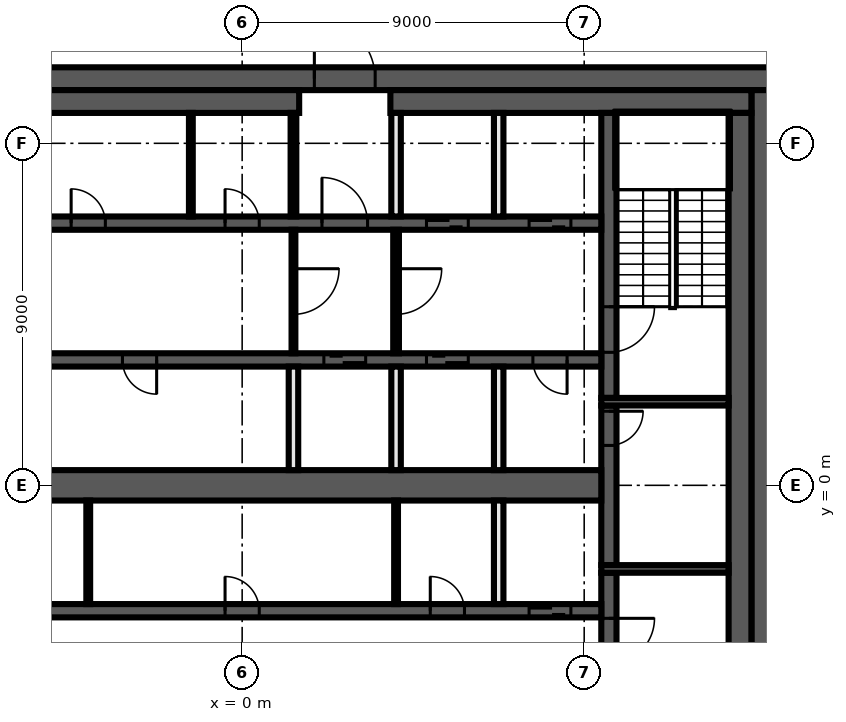
"""IFC4 building model, lengths in metres.
Left out: names, types, materials, properties, quantities, classifications, styles, units other than length and angle.
Written with IfcOpenShell. Run it as: python <this file> out.ifc"""

import sys

from ifc_helpers import new_model, si_unit, direction, frame, frame_2d, origin, place, context, subcontext, project, spatial, rectangle, extrude, element, fill, save


model = new_model("IFC4")
c1 = context("Model", 3, precision=1e-05, world=origin(), true_north=direction((0.0, 1.0)))
c2 = subcontext(c1, "Body", "Model", "MODEL_VIEW")
j1 = project(units=[si_unit("LENGTHUNIT", "METRE"), si_unit("PLANEANGLEUNIT", "RADIAN")], contexts=[c1])
p1 = place(None, origin())
s1 = spatial("IfcSite", under=j1, at=p1, CompositionType="ELEMENT")
p2 = place(p1, origin())
s2 = spatial("IfcBuilding", under=s1, at=p2, CompositionType="ELEMENT")
p3 = place(p2, frame((0.0, 0.0, 363.2)))
s3 = spatial("IfcBuildingStorey", under=s2, at=p3, CompositionType="ELEMENT", Elevation=363.2)
p4 = place(p3, frame((11.367, -20.469, 0.0), z_axis=(0.0, 0.0, 1.0), x_axis=(0.424125024155, 0.905603646131, 0.0)))
e1 = element("IfcWall", 1, at=p4, inside=s3, PredefinedType="SOLIDWALL", context=c2, shape_type="SweptSolid", body=[
    extrude(rectangle(XDim=28.801, YDim=0.25, at=frame_2d((14.401, 0.0))), origin(), (0.0, 0.0, 1.0), 3.8),
])
p5 = place(p3, frame((23.583, 5.614, 0.0), z_axis=(0.0, 0.0, 1.0), x_axis=(-0.671256862452, 0.741224813812, 0.0)))
e2 = element("IfcWall", 2, at=p5, inside=s3, PredefinedType="SOLIDWALL", context=c2, shape_type="SweptSolid", body=[
    extrude(rectangle(XDim=20.856, YDim=0.25, at=frame_2d((10.428, 0.0))), origin(), (0.0, 0.0, 1.0), 3.8),
])
p6 = place(p3, frame((-14.0, 10.7, 0.0), z_axis=(0.0, 0.0, 1.0), x_axis=(1.0, 0.0, 0.0)))
e3 = element("IfcWall", 3, at=p6, inside=s3, PredefinedType="SHEAR", context=c2, shape_type="SweptSolid", body=[
    extrude(rectangle(XDim=28.0, YDim=0.6, at=frame_2d((14.0, 0.0))), origin(), (0.0, 0.0, 1.0), 3.8),
])
p7 = place(p6, frame((15.9, 0.0, 0.0)))
e4 = element("IfcOpeningElement", 4, at=p7, cuts=e3, PredefinedType="OPENING", context=c2, shape_type="SweptSolid", body=[
    extrude(rectangle(XDim=1.6, YDim=2.1, at=frame_2d((0.8, 1.05))), frame((0.0, 0.31, 0.0), z_axis=(0.0, -1.0, 0.0), x_axis=(1.0, 0.0, 0.0)), (0.0, 0.0, 1.0), 0.62),
])
p8 = place(p3, frame((13.7, 10.4, 0.0), z_axis=(0.0, 0.0, 1.0), x_axis=(0.0, -1.0, 0.0)))
e5 = element("IfcWall", 5, at=p8, inside=s3, PredefinedType="SHEAR", context=c2, shape_type="SweptSolid", body=[
    extrude(rectangle(XDim=20.8, YDim=0.6, at=frame_2d((10.4, 0.0))), origin(), (0.0, 0.0, 1.0), 3.8),
])
p9 = place(p3, frame((-13.4, 10.1, 0.0), z_axis=(0.0, 0.0, 1.0), x_axis=(1.0, 0.0, 0.0)))
e6 = element("IfcWall", 6, at=p9, inside=s3, PredefinedType="SHEAR", context=c2, shape_type="SweptSolid", body=[
    extrude(rectangle(XDim=14.9, YDim=0.6, at=frame_2d((7.45, 0.0))), origin(), (0.0, 0.0, 1.0), 3.8),
])
p10 = place(p3, frame((3.9, 10.1, 0.0), z_axis=(0.0, 0.0, 1.0), x_axis=(1.0, 0.0, 0.0)))
e7 = element("IfcWall", 7, at=p10, inside=s3, PredefinedType="SHEAR", context=c2, shape_type="SweptSolid", body=[
    extrude(rectangle(XDim=9.5, YDim=0.6, at=frame_2d((4.75, 0.0))), origin(), (0.0, 0.0, 1.0), 3.8),
])
p11 = place(p3, frame((13.1, 9.8, 0.0), z_axis=(0.0, 0.0, 1.0), x_axis=(0.0, -1.0, 0.0)))
e8 = element("IfcWall", 8, at=p11, inside=s3, PredefinedType="SHEAR", context=c2, shape_type="SweptSolid", body=[
    extrude(rectangle(XDim=19.6, YDim=0.6, at=frame_2d((9.8, 0.0))), origin(), (0.0, 0.0, 1.0), 3.8),
])
p12 = place(p3, frame((9.65, -2.3, 0.0), z_axis=(0.0, 0.0, 1.0), x_axis=(0.0, -1.0, 0.0)))
e9 = element("IfcWall", 9, at=p12, inside=s3, PredefinedType="SHEAR", context=c2, shape_type="SweptSolid", body=[
    extrude(rectangle(XDim=7.5, YDim=0.4, at=frame_2d((3.75, 0.0))), origin(), (0.0, 0.0, 1.0), 3.8),
])
p13 = place(p12, frame((1.2, 0.0, 0.0)))
e10 = element("IfcOpeningElement", 10, at=p13, cuts=e9, PredefinedType="OPENING", context=c2, shape_type="SweptSolid", body=[
    extrude(rectangle(XDim=1.2, YDim=2.1, at=frame_2d((0.6, 1.05))), frame((0.0, 0.21, 0.0), z_axis=(0.0, -1.0, 0.0), x_axis=(1.0, 0.0, 0.0)), (0.0, 0.0, 1.0), 0.42),
])
p14 = place(p3, frame((9.65, 2.1, 0.0), z_axis=(0.0, 0.0, 1.0), x_axis=(0.0, -1.0, 0.0)))
e11 = element("IfcWall", 11, at=p14, inside=s3, PredefinedType="SHEAR", context=c2, shape_type="SweptSolid", body=[
    extrude(rectangle(XDim=4.2, YDim=0.4, at=frame_2d((2.1, 0.0))), origin(), (0.0, 0.0, 1.0), 3.8),
])
p15 = place(p14, frame((0.15, 0.0, 0.0)))
e12 = element("IfcOpeningElement", 12, at=p15, cuts=e11, PredefinedType="OPENING", context=c2, shape_type="SweptSolid", body=[
    extrude(rectangle(XDim=0.9, YDim=2.1, at=frame_2d((0.45, 1.05))), frame((0.0, 0.21, 0.0), z_axis=(0.0, -1.0, 0.0), x_axis=(1.0, 0.0, 0.0)), (0.0, 0.0, 1.0), 0.42),
])
p16 = place(p3, frame((9.65, 9.8, 0.0), z_axis=(0.0, 0.0, 1.0), x_axis=(0.0, -1.0, 0.0)))
e13 = element("IfcWall", 13, at=p16, inside=s3, PredefinedType="SHEAR", context=c2, shape_type="SweptSolid", body=[
    extrude(rectangle(XDim=7.5, YDim=0.4, at=frame_2d((3.75, 0.0))), origin(), (0.0, 0.0, 1.0), 3.8),
])
p17 = place(p16, frame((5.1, 0.0, 0.0)))
e14 = element("IfcOpeningElement", 14, at=p17, cuts=e13, PredefinedType="OPENING", context=c2, shape_type="SweptSolid", body=[
    extrude(rectangle(XDim=1.2, YDim=2.1, at=frame_2d((0.6, 1.05))), frame((0.0, 0.21, 0.0), z_axis=(0.0, -1.0, 0.0), x_axis=(1.0, 0.0, 0.0)), (0.0, 0.0, 1.0), 0.42),
])
for number, where, z_axis, x_axis in (
    (15, (9.45, 2.2, 0.0), (0.0, 0.0, 1.0), (1.0, 0.0, 0.0)),
    (16, (9.45, -2.2, 0.0), (0.0, 0.0, 1.0), (1.0, 0.0, 0.0)),
):
    element("IfcWall", number, at=place(p3, frame(where, z_axis=z_axis, x_axis=x_axis)), inside=s3, PredefinedType="SHEAR", context=c2, shape_type="SweptSolid", body=[
        extrude(rectangle(XDim=3.35, YDim=0.2, at=frame_2d((1.675, 0.0))), origin(), (0.0, 0.0, 1.0), 3.8),
    ])
p18 = place(p3, frame((-9.45, 6.9, 0.0), z_axis=(0.0, 0.0, 1.0), x_axis=(1.0, 0.0, 0.0)))
e17 = element("IfcWall", 17, at=p18, inside=s3, PredefinedType="SHEAR", context=c2, shape_type="SweptSolid", body=[
    extrude(rectangle(XDim=18.9, YDim=0.35, at=frame_2d((9.45, 0.0))), origin(), (0.0, 0.0, 1.0), 3.8),
])
p19 = place(p18, frame((11.55, 0.0, 0.0)))
e18 = element("IfcOpeningElement", 18, at=p19, cuts=e17, PredefinedType="OPENING", context=c2, shape_type="SweptSolid", body=[
    extrude(rectangle(XDim=1.2, YDim=2.1, at=frame_2d((0.6, 1.05))), frame((0.0, 0.185, 0.0), z_axis=(0.0, -1.0, 0.0), x_axis=(1.0, 0.0, 0.0)), (0.0, 0.0, 1.0), 0.37),
])
p20 = place(p18, frame((14.3, 0.0, 0.0)))
e19 = element("IfcOpeningElement", 19, at=p20, cuts=e17, PredefinedType="OPENING", context=c2, shape_type="SweptSolid", body=[
    extrude(rectangle(XDim=1.1, YDim=2.1, at=frame_2d((0.55, 1.05))), frame((0.0, 0.185, 0.0), z_axis=(0.0, -1.0, 0.0), x_axis=(1.0, 0.0, 0.0)), (0.0, 0.0, 1.0), 0.37),
])
p21 = place(p18, frame((17.0, 0.0, 0.0)))
e20 = element("IfcOpeningElement", 20, at=p21, cuts=e17, PredefinedType="OPENING", context=c2, shape_type="SweptSolid", body=[
    extrude(rectangle(XDim=1.1, YDim=2.1, at=frame_2d((0.55, 1.05))), frame((0.0, 0.185, 0.0), z_axis=(0.0, -1.0, 0.0), x_axis=(1.0, 0.0, 0.0)), (0.0, 0.0, 1.0), 0.37),
])
p22 = place(p18, frame((0.9, 0.0, 0.0)))
e21 = element("IfcOpeningElement", 21, at=p22, cuts=e17, PredefinedType="OPENING", context=c2, shape_type="SweptSolid", body=[
    extrude(rectangle(XDim=0.9, YDim=2.1, at=frame_2d((0.45, 1.05))), frame((0.0, 0.185, 0.0), z_axis=(0.0, -1.0, 0.0), x_axis=(1.0, 0.0, 0.0)), (0.0, 0.0, 1.0), 0.37),
])
p23 = place(p18, frame((4.95, 0.0, 0.0)))
e22 = element("IfcOpeningElement", 22, at=p23, cuts=e17, PredefinedType="OPENING", context=c2, shape_type="SweptSolid", body=[
    extrude(rectangle(XDim=0.9, YDim=2.1, at=frame_2d((0.45, 1.05))), frame((0.0, 0.185, 0.0), z_axis=(0.0, -1.0, 0.0), x_axis=(1.0, 0.0, 0.0)), (0.0, 0.0, 1.0), 0.37),
])
p24 = place(p18, frame((9.0, 0.0, 0.0)))
e23 = element("IfcOpeningElement", 23, at=p24, cuts=e17, PredefinedType="OPENING", context=c2, shape_type="SweptSolid", body=[
    extrude(rectangle(XDim=0.9, YDim=2.1, at=frame_2d((0.45, 1.05))), frame((0.0, 0.185, 0.0), z_axis=(0.0, -1.0, 0.0), x_axis=(1.0, 0.0, 0.0)), (0.0, 0.0, 1.0), 0.37),
])
p25 = place(p3, frame((9.45, 3.3, 0.0), z_axis=(0.0, 0.0, 1.0), x_axis=(-1.0, 0.0, 0.0)))
e24 = element("IfcWall", 24, at=p25, inside=s3, PredefinedType="SHEAR", context=c2, shape_type="SweptSolid", body=[
    extrude(rectangle(XDim=18.9, YDim=0.35, at=frame_2d((9.45, 0.0))), origin(), (0.0, 0.0, 1.0), 3.8),
])
p26 = place(p25, frame((6.2, 0.0, 0.0)))
e25 = element("IfcOpeningElement", 25, at=p26, cuts=e24, PredefinedType="OPENING", context=c2, shape_type="SweptSolid", body=[
    extrude(rectangle(XDim=1.1, YDim=2.1, at=frame_2d((0.55, 1.05))), frame((0.0, 0.185, 0.0), z_axis=(0.0, -1.0, 0.0), x_axis=(1.0, 0.0, 0.0)), (0.0, 0.0, 1.0), 0.37),
])
p27 = place(p25, frame((3.5, 0.0, 0.0)))
e26 = element("IfcOpeningElement", 26, at=p27, cuts=e24, PredefinedType="OPENING", context=c2, shape_type="SweptSolid", body=[
    extrude(rectangle(XDim=1.1, YDim=2.1, at=frame_2d((0.55, 1.05))), frame((0.0, 0.185, 0.0), z_axis=(0.0, -1.0, 0.0), x_axis=(1.0, 0.0, 0.0)), (0.0, 0.0, 1.0), 0.37),
])
p28 = place(p25, frame((0.9, 0.0, 0.0)))
e27 = element("IfcOpeningElement", 27, at=p28, cuts=e24, PredefinedType="OPENING", context=c2, shape_type="SweptSolid", body=[
    extrude(rectangle(XDim=0.9, YDim=2.1, at=frame_2d((0.45, 1.05))), frame((0.0, 0.185, 0.0), z_axis=(0.0, -1.0, 0.0), x_axis=(1.0, 0.0, 0.0)), (0.0, 0.0, 1.0), 0.37),
])
p29 = place(p25, frame((17.1, 0.0, 0.0)))
e28 = element("IfcOpeningElement", 28, at=p29, cuts=e24, PredefinedType="OPENING", context=c2, shape_type="SweptSolid", body=[
    extrude(rectangle(XDim=0.9, YDim=2.1, at=frame_2d((0.45, 1.05))), frame((0.0, 0.185, 0.0), z_axis=(0.0, -1.0, 0.0), x_axis=(1.0, 0.0, 0.0)), (0.0, 0.0, 1.0), 0.37),
])
p30 = place(p25, frame((11.7, 0.0, 0.0)))
e29 = element("IfcOpeningElement", 29, at=p30, cuts=e24, PredefinedType="OPENING", context=c2, shape_type="SweptSolid", body=[
    extrude(rectangle(XDim=0.9, YDim=2.1, at=frame_2d((0.45, 1.05))), frame((0.0, 0.185, 0.0), z_axis=(0.0, -1.0, 0.0), x_axis=(1.0, 0.0, 0.0)), (0.0, 0.0, 1.0), 0.37),
])
p31 = place(p3, frame((-9.45, -3.3, 0.0), z_axis=(0.0, 0.0, 1.0), x_axis=(1.0, 0.0, 0.0)))
e30 = element("IfcWall", 30, at=p31, inside=s3, PredefinedType="SHEAR", context=c2, shape_type="SweptSolid", body=[
    extrude(rectangle(XDim=18.9, YDim=0.35, at=frame_2d((9.45, 0.0))), origin(), (0.0, 0.0, 1.0), 3.8),
])
p32 = place(p31, frame((17.0, 0.0, 0.0)))
e31 = element("IfcOpeningElement", 31, at=p32, cuts=e30, PredefinedType="OPENING", context=c2, shape_type="SweptSolid", body=[
    extrude(rectangle(XDim=1.1, YDim=2.1, at=frame_2d((0.55, 1.05))), frame((0.0, 0.185, 0.0), z_axis=(0.0, -1.0, 0.0), x_axis=(1.0, 0.0, 0.0)), (0.0, 0.0, 1.0), 0.37),
])
p33 = place(p31, frame((2.25, 0.0, 0.0)))
e32 = element("IfcOpeningElement", 32, at=p33, cuts=e30, PredefinedType="OPENING", context=c2, shape_type="SweptSolid", body=[
    extrude(rectangle(XDim=0.9, YDim=2.1, at=frame_2d((0.45, 1.05))), frame((0.0, 0.185, 0.0), z_axis=(0.0, -1.0, 0.0), x_axis=(1.0, 0.0, 0.0)), (0.0, 0.0, 1.0), 0.37),
])
p34 = place(p31, frame((9.0, 0.0, 0.0)))
e33 = element("IfcOpeningElement", 33, at=p34, cuts=e30, PredefinedType="OPENING", context=c2, shape_type="SweptSolid", body=[
    extrude(rectangle(XDim=0.9, YDim=2.1, at=frame_2d((0.45, 1.05))), frame((0.0, 0.185, 0.0), z_axis=(0.0, -1.0, 0.0), x_axis=(1.0, 0.0, 0.0)), (0.0, 0.0, 1.0), 0.37),
])
p35 = place(p31, frame((14.4, 0.0, 0.0)))
e34 = element("IfcOpeningElement", 34, at=p35, cuts=e30, PredefinedType="OPENING", context=c2, shape_type="SweptSolid", body=[
    extrude(rectangle(XDim=0.9, YDim=2.1, at=frame_2d((0.45, 1.05))), frame((0.0, 0.185, 0.0), z_axis=(0.0, -1.0, 0.0), x_axis=(1.0, 0.0, 0.0)), (0.0, 0.0, 1.0), 0.37),
])
p36 = place(p3, frame((-9.45, 0.0, 0.0), z_axis=(0.0, 0.0, 1.0), x_axis=(1.0, 0.0, 0.0)))
e35 = element("IfcWall", 35, at=p36, inside=s3, PredefinedType="SHEAR", context=c2, shape_type="SweptSolid", body=[
    extrude(rectangle(XDim=18.9, YDim=0.8, at=frame_2d((9.45, 0.0))), origin(), (0.0, 0.0, 1.0), 3.8),
])
for number, where, z_axis, x_axis in (
    (36, (6.75, -3.125, 0.0), (0.0, 0.0, 1.0), (0.0, 1.0, 0.0)),
    (37, (6.75, 0.4, 0.0), (0.0, 0.0, 1.0), (0.0, 1.0, 0.0)),
    (38, (6.75, 7.075, 0.0), (0.0, 0.0, 1.0), (0.0, 1.0, 0.0)),
):
    element("IfcWall", number, at=place(p3, frame(where, z_axis=z_axis, x_axis=x_axis)), inside=s3, PredefinedType="SOLIDWALL", context=c2, shape_type="SweptSolid", body=[
        extrude(rectangle(XDim=2.725, YDim=0.25, at=frame_2d((1.363, 0.0))), origin(), (0.0, 0.0, 1.0), 3.8),
    ])
p37 = place(p3, frame((4.05, 6.725, 0.0), z_axis=(0.0, 0.0, 1.0), x_axis=(0.0, -1.0, 0.0)))
e39 = element("IfcWall", 39, at=p37, inside=s3, PredefinedType="PARTITIONING", context=c2, shape_type="SweptSolid", body=[
    extrude(rectangle(XDim=3.25, YDim=0.15, at=frame_2d((1.625, 0.0))), origin(), (0.0, 0.0, 1.0), 3.8),
])
p38 = place(p37, frame((1.025, 0.0, 0.0)))
e40 = element("IfcOpeningElement", 40, at=p38, cuts=e39, PredefinedType="OPENING", context=c2, shape_type="SweptSolid", body=[
    extrude(rectangle(XDim=1.2, YDim=2.1, at=frame_2d((0.6, 1.05))), frame((0.0, 0.085, 0.0), z_axis=(0.0, -1.0, 0.0), x_axis=(1.0, 0.0, 0.0)), (0.0, 0.0, 1.0), 0.17),
])
p39 = place(p3, frame((4.05, -3.125, 0.0), z_axis=(0.0, 0.0, 1.0), x_axis=(0.0, 1.0, 0.0)))
e41 = element("IfcWall", 41, at=p39, inside=s3, PredefinedType="PARTITIONING", context=c2, shape_type="SweptSolid", body=[
    extrude(rectangle(XDim=2.725, YDim=0.1, at=frame_2d((1.363, 0.0))), origin(), (0.0, 0.0, 1.0), 3.8),
])
for number, where, z_axis, x_axis in (
    (42, (4.05, 0.4, 0.0), (0.0, 0.0, 1.0), (0.0, 1.0, 0.0)),
    (43, (4.05, 7.075, 0.0), (0.0, 0.0, 1.0), (0.0, 1.0, 0.0)),
):
    element("IfcWall", number, at=place(p3, frame(where, z_axis=z_axis, x_axis=x_axis)), inside=s3, PredefinedType="SOLIDWALL", context=c2, shape_type="SweptSolid", body=[
        extrude(rectangle(XDim=2.725, YDim=0.25, at=frame_2d((1.363, 0.0))), origin(), (0.0, 0.0, 1.0), 3.8),
    ])
p40 = place(p3, frame((1.35, 7.075, 0.0), z_axis=(0.0, 0.0, 1.0), x_axis=(0.0, 1.0, 0.0)))
e44 = element("IfcWall", 44, at=p40, inside=s3, PredefinedType="PARTITIONING", context=c2, shape_type="SweptSolid", body=[
    extrude(rectangle(XDim=2.725, YDim=0.15, at=frame_2d((1.363, 0.0))), origin(), (0.0, 0.0, 1.0), 3.8),
])
p41 = place(p3, frame((1.35, 6.725, 0.0), z_axis=(0.0, 0.0, 1.0), x_axis=(0.0, -1.0, 0.0)))
e45 = element("IfcWall", 45, at=p41, inside=s3, PredefinedType="PARTITIONING", context=c2, shape_type="SweptSolid", body=[
    extrude(rectangle(XDim=3.25, YDim=0.1, at=frame_2d((1.625, 0.0))), origin(), (0.0, 0.0, 1.0), 3.8),
])
p42 = place(p41, frame((1.025, 0.0, 0.0)))
e46 = element("IfcOpeningElement", 46, at=p42, cuts=e45, PredefinedType="OPENING", context=c2, shape_type="SweptSolid", body=[
    extrude(rectangle(XDim=1.2, YDim=2.1, at=frame_2d((0.6, 1.05))), frame((0.0, 0.06, 0.0), z_axis=(0.0, -1.0, 0.0), x_axis=(1.0, 0.0, 0.0)), (0.0, 0.0, 1.0), 0.12),
])
p43 = place(p3, frame((1.35, 0.4, 0.0), z_axis=(0.0, 0.0, 1.0), x_axis=(0.0, 1.0, 0.0)))
e47 = element("IfcWall", 47, at=p43, inside=s3, PredefinedType="SOLIDWALL", context=c2, shape_type="SweptSolid", body=[
    extrude(rectangle(XDim=2.725, YDim=0.25, at=frame_2d((1.363, 0.0))), origin(), (0.0, 0.0, 1.0), 3.8),
])
for number, where, z_axis, x_axis in (
    (48, (-1.35, 7.075, 0.0), (0.0, 0.0, 1.0), (0.0, 1.0, 0.0)),
    (49, (-4.05, -3.125, 0.0), (0.0, 0.0, 1.0), (0.0, 1.0, 0.0)),
):
    element("IfcWall", number, at=place(p3, frame(where, z_axis=z_axis, x_axis=x_axis)), inside=s3, PredefinedType="PARTITIONING", context=c2, shape_type="SweptSolid", body=[
        extrude(rectangle(XDim=2.725, YDim=0.1, at=frame_2d((1.363, 0.0))), origin(), (0.0, 0.0, 1.0), 3.8),
    ])
p44 = place(p15, origin())
e50 = element("IfcDoor", 50, at=p44, inside=s3, OperationType="SINGLE_SWING_RIGHT", PredefinedType="DOOR", context=c2, shape_type="SweptSolid", body=[
    extrude(rectangle(XDim=0.9, YDim=2.1, at=frame_2d((0.45, 1.05))), frame((0.0, 0.025, 0.0), z_axis=(0.0, -1.0, 0.0), x_axis=(1.0, 0.0, 0.0)), (0.0, 0.0, 1.0), 0.05),
])
fill(e12, e50)
p45 = place(p7, origin())
e51 = element("IfcDoor", 51, at=p45, inside=s3, OperationType="DOUBLE_DOOR_SINGLE_SWING", PredefinedType="DOOR", context=c2, shape_type="SweptSolid", body=[
    extrude(rectangle(XDim=1.6, YDim=2.1, at=frame_2d((0.8, 1.05))), frame((0.0, 0.025, 0.0), z_axis=(0.0, -1.0, 0.0), x_axis=(1.0, 0.0, 0.0)), (0.0, 0.0, 1.0), 0.05),
])
fill(e4, e51)
p46 = place(p19, origin())
e52 = element("IfcDoor", 52, at=p46, inside=s3, OperationType="SINGLE_SWING_LEFT", PredefinedType="DOOR", context=c2, shape_type="SweptSolid", body=[
    extrude(rectangle(XDim=1.2, YDim=2.1, at=frame_2d((0.6, 1.05))), frame((0.0, 0.025, 0.0), z_axis=(0.0, -1.0, 0.0), x_axis=(1.0, 0.0, 0.0)), (0.0, 0.0, 1.0), 0.05),
])
fill(e18, e52)
p47 = place(p20, origin())
e53 = element("IfcDoor", 53, at=p47, inside=s3, OperationType="DOUBLE_DOOR_SLIDING", PredefinedType="DOOR", context=c2, shape_type="SweptSolid", body=[
    extrude(rectangle(XDim=1.1, YDim=2.1, at=frame_2d((0.55, 1.05))), frame((0.0, 0.025, 0.0), z_axis=(0.0, -1.0, 0.0), x_axis=(1.0, 0.0, 0.0)), (0.0, 0.0, 1.0), 0.05),
])
fill(e19, e53)
p48 = place(p21, origin())
e54 = element("IfcDoor", 54, at=p48, inside=s3, OperationType="DOUBLE_DOOR_SLIDING", PredefinedType="DOOR", context=c2, shape_type="SweptSolid", body=[
    extrude(rectangle(XDim=1.1, YDim=2.1, at=frame_2d((0.55, 1.05))), frame((0.0, 0.025, 0.0), z_axis=(0.0, -1.0, 0.0), x_axis=(1.0, 0.0, 0.0)), (0.0, 0.0, 1.0), 0.05),
])
fill(e20, e54)
p49 = place(p26, origin())
e55 = element("IfcDoor", 55, at=p49, inside=s3, OperationType="DOUBLE_DOOR_SLIDING", PredefinedType="DOOR", context=c2, shape_type="SweptSolid", body=[
    extrude(rectangle(XDim=1.1, YDim=2.1, at=frame_2d((0.55, 1.05))), frame((0.0, 0.025, 0.0), z_axis=(0.0, -1.0, 0.0), x_axis=(1.0, 0.0, 0.0)), (0.0, 0.0, 1.0), 0.05),
])
fill(e25, e55)
p50 = place(p27, origin())
e56 = element("IfcDoor", 56, at=p50, inside=s3, OperationType="DOUBLE_DOOR_SLIDING", PredefinedType="DOOR", context=c2, shape_type="SweptSolid", body=[
    extrude(rectangle(XDim=1.1, YDim=2.1, at=frame_2d((0.55, 1.05))), frame((0.0, 0.025, 0.0), z_axis=(0.0, -1.0, 0.0), x_axis=(1.0, 0.0, 0.0)), (0.0, 0.0, 1.0), 0.05),
])
fill(e26, e56)
p51 = place(p28, origin())
e57 = element("IfcDoor", 57, at=p51, inside=s3, OperationType="SINGLE_SWING_LEFT", PredefinedType="DOOR", context=c2, shape_type="SweptSolid", body=[
    extrude(rectangle(XDim=0.9, YDim=2.1, at=frame_2d((0.45, 1.05))), frame((0.0, 0.025, 0.0), z_axis=(0.0, -1.0, 0.0), x_axis=(1.0, 0.0, 0.0)), (0.0, 0.0, 1.0), 0.05),
])
fill(e27, e57)
p52 = place(p32, origin())
e58 = element("IfcDoor", 58, at=p52, inside=s3, OperationType="DOUBLE_DOOR_SLIDING", PredefinedType="DOOR", context=c2, shape_type="SweptSolid", body=[
    extrude(rectangle(XDim=1.1, YDim=2.1, at=frame_2d((0.55, 1.05))), frame((0.0, 0.025, 0.0), z_axis=(0.0, -1.0, 0.0), x_axis=(1.0, 0.0, 0.0)), (0.0, 0.0, 1.0), 0.05),
])
fill(e31, e58)
p53 = place(p23, origin())
e59 = element("IfcDoor", 59, at=p53, inside=s3, OperationType="SINGLE_SWING_LEFT", PredefinedType="DOOR", context=c2, shape_type="SweptSolid", body=[
    extrude(rectangle(XDim=0.9, YDim=2.1, at=frame_2d((0.45, 1.05))), frame((0.0, 0.025, 0.0), z_axis=(0.0, -1.0, 0.0), x_axis=(1.0, 0.0, 0.0)), (0.0, 0.0, 1.0), 0.05),
])
fill(e22, e59)
p54 = place(p24, origin())
e60 = element("IfcDoor", 60, at=p54, inside=s3, OperationType="SINGLE_SWING_RIGHT", PredefinedType="DOOR", context=c2, shape_type="SweptSolid", body=[
    extrude(rectangle(XDim=0.9, YDim=2.1, at=frame_2d((0.45, 1.05))), frame((0.0, 0.025, 0.0), z_axis=(0.0, -1.0, 0.0), x_axis=(1.0, 0.0, 0.0)), (0.0, 0.0, 1.0), 0.05),
])
fill(e23, e60)
p55 = place(p30, origin())
e61 = element("IfcDoor", 61, at=p55, inside=s3, OperationType="SINGLE_SWING_RIGHT", PredefinedType="DOOR", context=c2, shape_type="SweptSolid", body=[
    extrude(rectangle(XDim=0.9, YDim=2.1, at=frame_2d((0.45, 1.05))), frame((0.0, 0.025, 0.0), z_axis=(0.0, -1.0, 0.0), x_axis=(1.0, 0.0, 0.0)), (0.0, 0.0, 1.0), 0.05),
])
fill(e29, e61)
p56 = place(p34, origin())
e62 = element("IfcDoor", 62, at=p56, inside=s3, OperationType="SINGLE_SWING_RIGHT", PredefinedType="DOOR", context=c2, shape_type="SweptSolid", body=[
    extrude(rectangle(XDim=0.9, YDim=2.1, at=frame_2d((0.45, 1.05))), frame((0.0, 0.025, 0.0), z_axis=(0.0, -1.0, 0.0), x_axis=(1.0, 0.0, 0.0)), (0.0, 0.0, 1.0), 0.05),
])
fill(e33, e62)
p57 = place(p35, origin())
e63 = element("IfcDoor", 63, at=p57, inside=s3, OperationType="SINGLE_SWING_LEFT", PredefinedType="DOOR", context=c2, shape_type="SweptSolid", body=[
    extrude(rectangle(XDim=0.9, YDim=2.1, at=frame_2d((0.45, 1.05))), frame((0.0, 0.025, 0.0), z_axis=(0.0, -1.0, 0.0), x_axis=(1.0, 0.0, 0.0)), (0.0, 0.0, 1.0), 0.05),
])
fill(e34, e63)
p58 = place(p17, origin())
e64 = element("IfcDoor", 64, at=p58, inside=s3, OperationType="SINGLE_SWING_LEFT", PredefinedType="DOOR", context=c2, shape_type="SweptSolid", body=[
    extrude(rectangle(XDim=1.2, YDim=2.1, at=frame_2d((0.6, 1.05))), frame((0.0, 0.025, 0.0), z_axis=(0.0, -1.0, 0.0), x_axis=(1.0, 0.0, 0.0)), (0.0, 0.0, 1.0), 0.05),
])
fill(e14, e64)
p59 = place(p13, origin())
e65 = element("IfcDoor", 65, at=p59, inside=s3, OperationType="SINGLE_SWING_RIGHT", PredefinedType="DOOR", context=c2, shape_type="SweptSolid", body=[
    extrude(rectangle(XDim=1.2, YDim=2.1, at=frame_2d((0.6, 1.05))), frame((0.0, 0.025, 0.0), z_axis=(0.0, -1.0, 0.0), x_axis=(1.0, 0.0, 0.0)), (0.0, 0.0, 1.0), 0.05),
])
fill(e10, e65)
p60 = place(p42, origin())
e66 = element("IfcDoor", 66, at=p60, inside=s3, OperationType="SINGLE_SWING_LEFT", PredefinedType="DOOR", context=c2, shape_type="SweptSolid", body=[
    extrude(rectangle(XDim=1.2, YDim=2.1, at=frame_2d((0.6, 1.05))), frame((0.0, 0.025, 0.0), z_axis=(0.0, -1.0, 0.0), x_axis=(1.0, 0.0, 0.0)), (0.0, 0.0, 1.0), 0.05),
])
fill(e46, e66)
p61 = place(p38, origin())
e67 = element("IfcDoor", 67, at=p61, inside=s3, OperationType="SINGLE_SWING_RIGHT", PredefinedType="DOOR", context=c2, shape_type="SweptSolid", body=[
    extrude(rectangle(XDim=1.2, YDim=2.1, at=frame_2d((0.6, 1.05))), frame((0.0, 0.025, 0.0), z_axis=(0.0, -1.0, 0.0), x_axis=(1.0, 0.0, 0.0)), (0.0, 0.0, 1.0), 0.05),
])
fill(e40, e67)
save(model, sys.argv[1])
